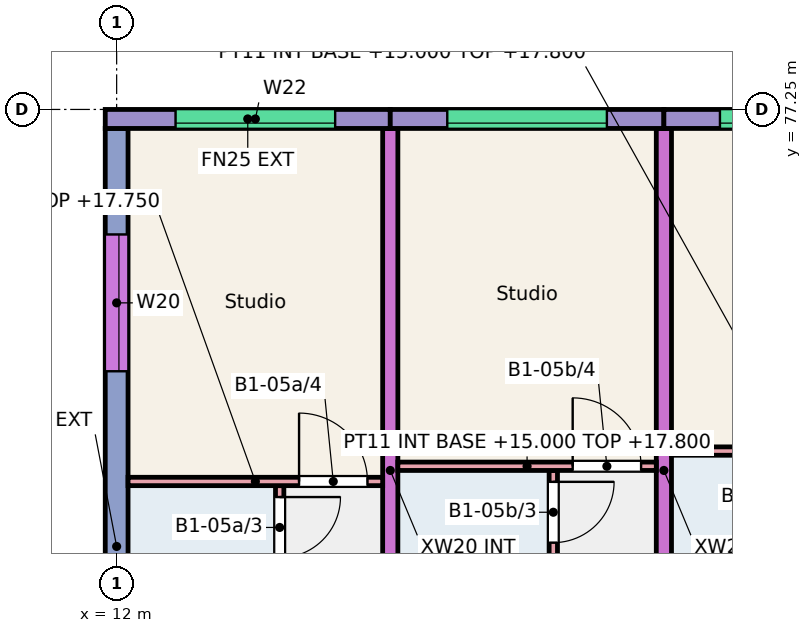
"""IFC4 building model, lengths in metres.
Left out: names, types, materials, properties, quantities, classifications, styles, units other than length and angle.
Written with IfcOpenShell. Run it as: python <this file> out.ifc"""

import sys

from ifc_helpers import new_model, si_unit, direction, frame, frame_2d, origin, place, context, subcontext, project, spatial, rectangle, extrude, element, fill, save


model = new_model("IFC4")
c1 = context("Model", 3, precision=1e-05, world=origin(), true_north=direction((0.0, 1.0)))
c2 = subcontext(c1, "Body", "Model", "MODEL_VIEW")
j1 = project(units=[si_unit("LENGTHUNIT", "METRE"), si_unit("PLANEANGLEUNIT", "RADIAN")], contexts=[c1])
p1 = place(None, origin())
s1 = spatial("IfcSite", under=j1, at=p1, CompositionType="ELEMENT")
p2 = place(p1, origin())
s2 = spatial("IfcBuilding", under=s1, at=p2, CompositionType="ELEMENT")
p3 = place(p2, frame((0.0, 0.0, 15.0)))
s3 = spatial("IfcBuildingStorey", under=s2, at=p3, CompositionType="ELEMENT", Elevation=15.0)
p4 = place(p3, frame((12.0, 66.0, 0.0), z_axis=(0.0, 0.0, 1.0), x_axis=(0.0, 1.0, 0.0)))
e1 = element("IfcWall", 1, at=p4, inside=s3, PredefinedType="SHEAR", context=c2, shape_type="SweptSolid", body=[
    extrude(rectangle(XDim=11.0, YDim=0.3, at=frame_2d((5.5, 0.0))), origin(), (0.0, 0.0, 1.0), 3.0),
])
p5 = place(p4, frame((2.6, 0.0, 0.9)))
e2 = element("IfcOpeningElement", 2, at=p5, cuts=e1, PredefinedType="OPENING", context=c2, shape_type="SweptSolid", body=[
    extrude(rectangle(XDim=1.2, YDim=1.5, at=frame_2d((0.6, 0.75))), frame((0.0, 0.16, 0.0), z_axis=(0.0, -1.0, 0.0), x_axis=(1.0, 0.0, 0.0)), (0.0, 0.0, 1.0), 0.32),
])
p6 = place(p4, frame((7.805, 0.0, 0.9)))
e3 = element("IfcOpeningElement", 3, at=p6, cuts=e1, PredefinedType="OPENING", context=c2, shape_type="SweptSolid", body=[
    extrude(rectangle(XDim=1.8, YDim=1.5, at=frame_2d((0.9, 0.75))), frame((0.0, 0.16, 0.0), z_axis=(0.0, -1.0, 0.0), x_axis=(1.0, 0.0, 0.0)), (0.0, 0.0, 1.0), 0.32),
])
for number, where, z_axis, x_axis in (
    (4, (15.6, 68.0, 0.0), (0.0, 0.0, 1.0), (0.0, 1.0, 0.0)),
    (5, (19.2, 68.0, 0.0), (0.0, 0.0, 1.0), (0.0, 1.0, 0.0)),
):
    element("IfcWall", number, at=place(p3, frame(where, z_axis=z_axis, x_axis=x_axis)), inside=s3, PredefinedType="SHEAR", context=c2, shape_type="SweptSolid", body=[
        extrude(rectangle(XDim=9.0, YDim=0.2, at=frame_2d((4.5, 0.0))), origin(), (0.0, 0.0, 1.0), 3.0),
    ])
p7 = place(p3, frame((11.85, 77.125, 0.0), z_axis=(0.0, 0.0, 1.0), x_axis=(1.0, 0.0, 0.0)))
e6 = element("IfcWall", 6, at=p7, inside=s3, PredefinedType="SOLIDWALL", context=c2, shape_type="SweptSolid", body=[
    extrude(rectangle(XDim=3.75, YDim=0.25, at=frame_2d((1.875, 0.0))), origin(), (0.0, 0.0, 1.0), 3.0),
])
p8 = place(p7, frame((0.925, 0.0, 1.2)))
e7 = element("IfcOpeningElement", 7, at=p8, cuts=e6, PredefinedType="OPENING", context=c2, shape_type="SweptSolid", body=[
    extrude(rectangle(XDim=2.1, YDim=1.2, at=frame_2d((1.05, 0.6))), frame((0.0, 0.135, 0.0), z_axis=(0.0, -1.0, 0.0), x_axis=(1.0, 0.0, 0.0)), (0.0, 0.0, 1.0), 0.27),
])
p9 = place(p3, frame((15.6, 77.125, 0.0), z_axis=(0.0, 0.0, 1.0), x_axis=(1.0, 0.0, 0.0)))
e8 = element("IfcWall", 8, at=p9, inside=s3, PredefinedType="SOLIDWALL", context=c2, shape_type="SweptSolid", body=[
    extrude(rectangle(XDim=3.6, YDim=0.25, at=frame_2d((1.8, 0.0))), origin(), (0.0, 0.0, 1.0), 3.0),
])
p10 = place(p9, frame((0.75, 0.0, 1.2)))
e9 = element("IfcOpeningElement", 9, at=p10, cuts=e8, PredefinedType="OPENING", context=c2, shape_type="SweptSolid", body=[
    extrude(rectangle(XDim=2.1, YDim=1.2, at=frame_2d((1.05, 0.6))), frame((0.0, 0.135, 0.0), z_axis=(0.0, -1.0, 0.0), x_axis=(1.0, 0.0, 0.0)), (0.0, 0.0, 1.0), 0.27),
])
p11 = place(p3, frame((19.2, 77.125, 0.0), z_axis=(0.0, 0.0, 1.0), x_axis=(1.0, 0.0, 0.0)))
e10 = element("IfcWall", 10, at=p11, inside=s3, PredefinedType="SOLIDWALL", context=c2, shape_type="SweptSolid", body=[
    extrude(rectangle(XDim=3.6, YDim=0.25, at=frame_2d((1.8, 0.0))), origin(), (0.0, 0.0, 1.0), 3.0),
])
p12 = place(p11, frame((0.738, 0.0, 1.2)))
e11 = element("IfcOpeningElement", 11, at=p12, cuts=e10, PredefinedType="OPENING", context=c2, shape_type="SweptSolid", body=[
    extrude(rectangle(XDim=2.1, YDim=1.2, at=frame_2d((1.05, 0.6))), frame((0.0, 0.135, 0.0), z_axis=(0.0, -1.0, 0.0), x_axis=(1.0, 0.0, 0.0)), (0.0, 0.0, 1.0), 0.27),
])
p13 = place(p3, frame((14.145, 68.0, 0.0), z_axis=(0.0, 0.0, 1.0), x_axis=(0.0, 1.0, 0.0)))
e12 = element("IfcWall", 12, at=p13, inside=s3, PredefinedType="PARTITIONING", context=c2, shape_type="SweptSolid", body=[
    extrude(rectangle(XDim=4.3, YDim=0.11, at=frame_2d((2.15, 0.0))), origin(), (0.0, 0.0, 1.0), 2.75),
])
p14 = place(p13, frame((0.2, 0.0, 0.0)))
e13 = element("IfcOpeningElement", 13, at=p14, cuts=e12, PredefinedType="OPENING", context=c2, shape_type="SweptSolid", body=[
    extrude(rectangle(XDim=0.8, YDim=2.1, at=frame_2d((0.4, 1.05))), frame((0.0, 0.065, 0.0), z_axis=(0.0, -1.0, 0.0), x_axis=(1.0, 0.0, 0.0)), (0.0, 0.0, 1.0), 0.13),
])
p15 = place(p13, frame((3.35, 0.0, 0.0)))
e14 = element("IfcOpeningElement", 14, at=p15, cuts=e12, PredefinedType="OPENING", context=c2, shape_type="SweptSolid", body=[
    extrude(rectangle(XDim=0.8, YDim=2.1, at=frame_2d((0.4, 1.05))), frame((0.0, 0.065, 0.0), z_axis=(0.0, -1.0, 0.0), x_axis=(1.0, 0.0, 0.0)), (0.0, 0.0, 1.0), 0.13),
])
p16 = place(p3, frame((12.15, 72.355, 0.0), z_axis=(0.0, 0.0, 1.0), x_axis=(1.0, 0.0, 0.0)))
e15 = element("IfcWall", 15, at=p16, inside=s3, PredefinedType="PARTITIONING", context=c2, shape_type="SweptSolid", body=[
    extrude(rectangle(XDim=3.35, YDim=0.11, at=frame_2d((1.675, 0.0))), origin(), (0.0, 0.0, 1.0), 2.75),
])
p17 = place(p16, frame((2.25, 0.0, 0.0)))
e16 = element("IfcOpeningElement", 16, at=p17, cuts=e15, PredefinedType="OPENING", context=c2, shape_type="SweptSolid", body=[
    extrude(rectangle(XDim=0.9, YDim=2.1, at=frame_2d((0.45, 1.05))), frame((0.0, 0.065, 0.0), z_axis=(0.0, -1.0, 0.0), x_axis=(1.0, 0.0, 0.0)), (0.0, 0.0, 1.0), 0.13),
])
p18 = place(p3, frame((17.745, 68.0, 0.0), z_axis=(0.0, 0.0, 1.0), x_axis=(0.0, 1.0, 0.0)))
e17 = element("IfcWall", 17, at=p18, inside=s3, PredefinedType="PARTITIONING", context=c2, shape_type="SweptSolid", body=[
    extrude(rectangle(XDim=4.5, YDim=0.11, at=frame_2d((2.25, 0.0))), origin(), (0.0, 0.0, 1.0), 2.8),
])
p19 = place(p18, frame((0.2, 0.0, 0.0)))
e18 = element("IfcOpeningElement", 18, at=p19, cuts=e17, PredefinedType="OPENING", context=c2, shape_type="SweptSolid", body=[
    extrude(rectangle(XDim=0.8, YDim=2.1, at=frame_2d((0.4, 1.05))), frame((0.0, 0.065, 0.0), z_axis=(0.0, -1.0, 0.0), x_axis=(1.0, 0.0, 0.0)), (0.0, 0.0, 1.0), 0.13),
])
p20 = place(p18, frame((3.55, 0.0, 0.0)))
e19 = element("IfcOpeningElement", 19, at=p20, cuts=e17, PredefinedType="OPENING", context=c2, shape_type="SweptSolid", body=[
    extrude(rectangle(XDim=0.8, YDim=2.1, at=frame_2d((0.4, 1.05))), frame((0.0, 0.065, 0.0), z_axis=(0.0, -1.0, 0.0), x_axis=(1.0, 0.0, 0.0)), (0.0, 0.0, 1.0), 0.13),
])
p21 = place(p3, frame((15.7, 72.555, 0.0), z_axis=(0.0, 0.0, 1.0), x_axis=(1.0, 0.0, 0.0)))
e20 = element("IfcWall", 20, at=p21, inside=s3, PredefinedType="PARTITIONING", context=c2, shape_type="SweptSolid", body=[
    extrude(rectangle(XDim=3.4, YDim=0.11, at=frame_2d((1.7, 0.0))), origin(), (0.0, 0.0, 1.0), 2.8),
])
p22 = place(p21, frame((2.3, 0.0, 0.0)))
e21 = element("IfcOpeningElement", 21, at=p22, cuts=e20, PredefinedType="OPENING", context=c2, shape_type="SweptSolid", body=[
    extrude(rectangle(XDim=0.9, YDim=2.1, at=frame_2d((0.45, 1.05))), frame((0.0, 0.065, 0.0), z_axis=(0.0, -1.0, 0.0), x_axis=(1.0, 0.0, 0.0)), (0.0, 0.0, 1.0), 0.13),
])
p23 = place(p3, frame((19.3, 72.755, 0.0), z_axis=(0.0, 0.0, 1.0), x_axis=(1.0, 0.0, 0.0)))
e22 = element("IfcWall", 22, at=p23, inside=s3, PredefinedType="PARTITIONING", context=c2, shape_type="SweptSolid", body=[
    extrude(rectangle(XDim=3.375, YDim=0.11, at=frame_2d((1.688, 0.0))), origin(), (0.0, 0.0, 1.0), 2.8),
])
p24 = place(p23, frame((2.275, 0.0, 0.0)))
e23 = element("IfcOpeningElement", 23, at=p24, cuts=e22, PredefinedType="OPENING", context=c2, shape_type="SweptSolid", body=[
    extrude(rectangle(XDim=0.9, YDim=2.1, at=frame_2d((0.45, 1.05))), frame((0.0, 0.065, 0.0), z_axis=(0.0, -1.0, 0.0), x_axis=(1.0, 0.0, 0.0)), (0.0, 0.0, 1.0), 0.13),
])
p25 = place(p8, origin())
e24 = element("IfcWindow", 24, at=p25, inside=s3, PartitioningType="SINGLE_PANEL", PredefinedType="WINDOW", context=c2, shape_type="SweptSolid", body=[
    extrude(rectangle(XDim=2.1, YDim=1.2, at=frame_2d((1.05, 0.6))), frame((0.0, -0.025, 0.0), z_axis=(0.0, -1.0, 0.0), x_axis=(1.0, 0.0, 0.0)), (0.0, 0.0, 1.0), 0.06),
])
fill(e7, e24)
p26 = place(p6, origin())
e25 = element("IfcWindow", 25, at=p26, inside=s3, PartitioningType="SINGLE_PANEL", PredefinedType="WINDOW", context=c2, shape_type="SweptSolid", body=[
    extrude(rectangle(XDim=1.8, YDim=1.5, at=frame_2d((0.9, 0.75))), frame((0.0, 0.0, 0.0), z_axis=(0.0, -1.0, 0.0), x_axis=(1.0, 0.0, 0.0)), (0.0, 0.0, 1.0), 0.06),
])
fill(e3, e25)
p27 = place(p10, origin())
e26 = element("IfcWindow", 26, at=p27, inside=s3, PartitioningType="SINGLE_PANEL", PredefinedType="WINDOW", context=c2, shape_type="SweptSolid", body=[
    extrude(rectangle(XDim=2.1, YDim=1.2, at=frame_2d((1.05, 0.6))), frame((0.0, -0.025, 0.0), z_axis=(0.0, -1.0, 0.0), x_axis=(1.0, 0.0, 0.0)), (0.0, 0.0, 1.0), 0.06),
])
fill(e9, e26)
p28 = place(p12, origin())
e27 = element("IfcWindow", 27, at=p28, inside=s3, PartitioningType="SINGLE_PANEL", PredefinedType="WINDOW", context=c2, shape_type="SweptSolid", body=[
    extrude(rectangle(XDim=2.1, YDim=1.2, at=frame_2d((1.05, 0.6))), frame((0.0, -0.025, 0.0), z_axis=(0.0, -1.0, 0.0), x_axis=(1.0, 0.0, 0.0)), (0.0, 0.0, 1.0), 0.06),
])
fill(e11, e27)
p29 = place(p15, origin())
e28 = element("IfcDoor", 28, at=p29, inside=s3, OperationType="SINGLE_SWING_RIGHT", PredefinedType="DOOR", context=c2, shape_type="SweptSolid", body=[
    extrude(rectangle(XDim=0.8, YDim=2.1, at=frame_2d((0.4, 1.05))), frame((0.0, 0.025, 0.0), z_axis=(0.0, -1.0, 0.0), x_axis=(1.0, 0.0, 0.0)), (0.0, 0.0, 1.0), 0.05),
])
fill(e14, e28)
p30 = place(p17, origin())
e29 = element("IfcDoor", 29, at=p30, inside=s3, OperationType="SINGLE_SWING_LEFT", PredefinedType="DOOR", context=c2, shape_type="SweptSolid", body=[
    extrude(rectangle(XDim=0.9, YDim=2.1, at=frame_2d((0.45, 1.05))), frame((0.0, 0.025, 0.0), z_axis=(0.0, -1.0, 0.0), x_axis=(1.0, 0.0, 0.0)), (0.0, 0.0, 1.0), 0.05),
])
fill(e16, e29)
p31 = place(p20, origin())
e30 = element("IfcDoor", 30, at=p31, inside=s3, OperationType="SINGLE_SWING_RIGHT", PredefinedType="DOOR", context=c2, shape_type="SweptSolid", body=[
    extrude(rectangle(XDim=0.8, YDim=2.1, at=frame_2d((0.4, 1.05))), frame((0.0, 0.025, 0.0), z_axis=(0.0, -1.0, 0.0), x_axis=(1.0, 0.0, 0.0)), (0.0, 0.0, 1.0), 0.05),
])
fill(e19, e30)
p32 = place(p22, origin())
e31 = element("IfcDoor", 31, at=p32, inside=s3, OperationType="SINGLE_SWING_LEFT", PredefinedType="DOOR", context=c2, shape_type="SweptSolid", body=[
    extrude(rectangle(XDim=0.9, YDim=2.1, at=frame_2d((0.45, 1.05))), frame((0.0, 0.025, 0.0), z_axis=(0.0, -1.0, 0.0), x_axis=(1.0, 0.0, 0.0)), (0.0, 0.0, 1.0), 0.05),
])
fill(e21, e31)
save(model, sys.argv[1])
